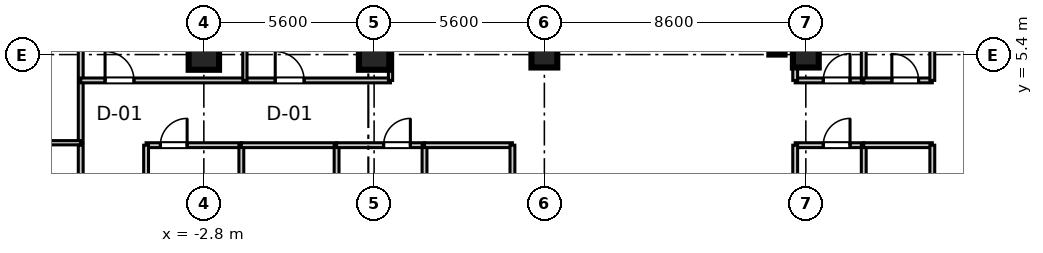
"""IFC4 building model, lengths in metres.
Left out: names, types, materials, properties, quantities, classifications, styles, units other than length and angle.
Written with IfcOpenShell. Run it as: python <this file> out.ifc"""

import sys

from ifc_helpers import new_model, si_unit, direction, frame, frame_2d, origin, origin_2d, place, context, subcontext, project, spatial, rectangle, extrude, source, transform, mapped, element, fill, save


model = new_model("IFC4")
c1 = context("Model", 3, precision=1e-05, world=origin(), true_north=direction((0.0, 1.0)))
c2 = subcontext(c1, "Body", "Model", "MODEL_VIEW")
j1 = project(units=[si_unit("LENGTHUNIT", "METRE"), si_unit("PLANEANGLEUNIT", "RADIAN")], contexts=[c1])
p1 = place(None, origin())
s1 = spatial("IfcSite", under=j1, at=p1, CompositionType="ELEMENT")
p2 = place(p1, origin())
s2 = spatial("IfcBuilding", under=s1, at=p2, CompositionType="ELEMENT")
p3 = place(p2, frame((0.0, 0.0, 227.1)))
s3 = spatial("IfcBuildingStorey", under=s2, at=p3, CompositionType="ELEMENT", Elevation=227.1)
m1 = source(origin(), c2, "Body", "SweptSolid", [
    extrude(rectangle(XDim=1.0, YDim=1.0, at=origin_2d()), origin(), (0.0, 0.0, 1.0), 3.655),
])
for number, where, z_axis, x_axis in (
    (1, (-2.8, 5.4, 0.0), (0.0, 0.0, 1.0), (1.0, 0.0, 0.0)),
    (2, (2.8, 5.4, 0.0), (0.0, 0.0, 1.0), (1.0, 0.0, 0.0)),
):
    element("IfcColumn", number, at=place(p3, frame(where, z_axis=z_axis, x_axis=x_axis)), inside=s3, PredefinedType="COLUMN", context=c2, shape_type="MappedRepresentation", body=[
        mapped(m1, transform((0.0, 0.0, 0.0), scale=1.0)),
    ])
m2 = source(origin(), c2, "Body", "SweptSolid", [
    extrude(rectangle(XDim=0.85, YDim=0.85, at=origin_2d()), origin(), (0.0, 0.0, 1.0), 3.655),
])
for number, where, z_axis, x_axis in (
    (3, (8.4, 5.4, 0.0), (0.0, 0.0, 1.0), (1.0, 0.0, 0.0)),
    (4, (17.0, 5.4, 0.0), (0.0, 0.0, 1.0), (1.0, 0.0, 0.0)),
):
    element("IfcColumn", number, at=place(p3, frame(where, z_axis=z_axis, x_axis=x_axis)), inside=s3, PredefinedType="PILASTER", context=c2, shape_type="MappedRepresentation", body=[
        mapped(m2, transform((0.0, 0.0, 0.0), scale=1.0)),
    ])
m3 = source(origin(), c2, "Body", "SweptSolid", [
    extrude(rectangle(XDim=11.6, YDim=0.5, at=frame_2d((5.8, 0.0))), origin(), (0.0, 0.0, 1.0), 3.41),
])
p4 = place(p3, frame((16.05, 5.4, 0.0), z_axis=(0.0, 0.0, 1.0), x_axis=(0.0, 1.0, 0.0)))
e5 = element("IfcWall", 5, at=p4, inside=s3, PredefinedType="SHEAR", context=c2, shape_type="MappedRepresentation", body=[
    mapped(m3, transform((0.0, 0.0, 0.0), scale=1.0)),
])
m4 = source(origin(), c2, "Body", "SweptSolid", [
    extrude(rectangle(XDim=2.255, YDim=0.16, at=frame_2d((1.127, 0.0))), origin(), (0.0, 0.0, 1.0), 2.75),
])
p5 = place(p3, frame((16.65, 4.55, 0.0), z_axis=(0.0, 0.0, 1.0), x_axis=(1.0, 0.0, 0.0)))
e6 = element("IfcWall", 6, at=p5, inside=s3, PredefinedType="PARTITIONING", context=c2, shape_type="MappedRepresentation", body=[
    mapped(m4, transform((0.0, 0.0, 0.0), scale=1.0)),
])
p6 = place(p5, frame((0.924, 0.0, 0.0)))
e7 = element("IfcOpeningElement", 7, at=p6, cuts=e6, PredefinedType="OPENING", context=c2, shape_type="SweptSolid", body=[
    extrude(rectangle(XDim=0.88, YDim=2.1, at=frame_2d((0.44, 1.05))), frame((0.0, 0.09, 0.0), z_axis=(0.0, -1.0, 0.0), x_axis=(1.0, 0.0, 0.0)), (0.0, 0.0, 1.0), 0.18),
])
m5 = source(origin(), c2, "Body", "SweptSolid", [
    extrude(rectangle(XDim=19.35, YDim=0.16, at=frame_2d((9.675, 0.0))), origin(), (0.0, 0.0, 1.0), 2.75),
])
for number, where, z_axis, x_axis in (
    (8, (16.65, 4.55, 0.0), (0.0, 0.0, 1.0), (0.0, 1.0, 0.0)),
    (9, (18.905, 4.55, 0.0), (0.0, 0.0, 1.0), (0.0, 1.0, 0.0)),
):
    element("IfcWall", number, at=place(p3, frame(where, z_axis=z_axis, x_axis=x_axis)), inside=s3, PredefinedType="PARTITIONING", context=c2, shape_type="MappedRepresentation", body=[
        mapped(m5, transform((0.0, 0.0, 0.0), scale=1.0)),
    ])
m6 = source(origin(), c2, "Body", "SweptSolid", [
    extrude(rectangle(XDim=2.255, YDim=0.16, at=frame_2d((1.127, 0.0))), origin(), (0.0, 0.0, 1.0), 2.75),
])
p7 = place(p3, frame((18.905, 4.55, 0.0), z_axis=(0.0, 0.0, 1.0), x_axis=(1.0, 0.0, 0.0)))
e10 = element("IfcWall", 10, at=p7, inside=s3, PredefinedType="PARTITIONING", context=c2, shape_type="MappedRepresentation", body=[
    mapped(m6, transform((0.0, 0.0, 0.0), scale=1.0)),
])
p8 = place(p7, frame((0.924, 0.0, 0.0)))
e11 = element("IfcOpeningElement", 11, at=p8, cuts=e10, PredefinedType="OPENING", context=c2, shape_type="SweptSolid", body=[
    extrude(rectangle(XDim=0.88, YDim=2.1, at=frame_2d((0.44, 1.05))), frame((0.0, 0.09, 0.0), z_axis=(0.0, -1.0, 0.0), x_axis=(1.0, 0.0, 0.0)), (0.0, 0.0, 1.0), 0.18),
])
m7 = source(origin(), c2, "Body", "SweptSolid", [
    extrude(rectangle(XDim=17.93, YDim=0.16, at=frame_2d((8.965, 0.0))), origin(), (0.0, 0.0, 1.0), 2.75),
])
p9 = place(p3, frame((21.16, 4.55, 0.0), z_axis=(0.0, 0.0, 1.0), x_axis=(0.0, 1.0, 0.0)))
e12 = element("IfcWall", 12, at=p9, inside=s3, PredefinedType="PARTITIONING", context=c2, shape_type="MappedRepresentation", body=[
    mapped(m7, transform((0.0, 0.0, 0.0), scale=1.0)),
])
m8 = source(origin(), c2, "Body", "SweptSolid", [
    extrude(rectangle(XDim=21.4, YDim=0.16, at=frame_2d((10.7, 0.0))), origin(), (0.0, 0.0, 1.0), 2.75),
])
p10 = place(p3, frame((-6.85, 2.5, 0.0), z_axis=(0.0, 0.0, 1.0), x_axis=(0.0, 1.0, 0.0)))
e13 = element("IfcWall", 13, at=p10, inside=s3, PredefinedType="PARTITIONING", context=c2, shape_type="MappedRepresentation", body=[
    mapped(m8, transform((0.0, 0.0, 0.0), scale=1.0)),
])
p11 = place(p10, frame((8.15, 0.0, 0.0)))
e14 = element("IfcOpeningElement", 14, at=p11, cuts=e13, PredefinedType="OPENING", context=c2, shape_type="SweptSolid", body=[
    extrude(rectangle(XDim=0.95, YDim=2.1, at=frame_2d((0.475, 1.05))), frame((0.0, 0.09, 0.0), z_axis=(0.0, -1.0, 0.0), x_axis=(1.0, 0.0, 0.0)), (0.0, 0.0, 1.0), 0.18),
])
m9 = source(origin(), c2, "Body", "SweptSolid", [
    extrude(rectangle(XDim=14.31, YDim=0.14, at=frame_2d((7.155, 0.0))), origin(), (0.0, 0.0, 1.0), 2.75),
])
p12 = place(p3, frame((-21.16, 2.5, 0.0), z_axis=(0.0, 0.0, 1.0), x_axis=(1.0, 0.0, 0.0)))
e15 = element("IfcWall", 15, at=p12, inside=s3, PredefinedType="PARTITIONING", context=c2, shape_type="MappedRepresentation", body=[
    mapped(m9, transform((0.0, 0.0, 0.0), scale=1.0)),
])
m10 = source(origin(), c2, "Body", "SweptSolid", [
    extrude(rectangle(XDim=10.19, YDim=0.16, at=frame_2d((5.095, 0.0))), origin(), (0.0, 0.0, 1.0), 2.75),
])
p13 = place(p3, frame((-6.85, 4.55, 0.0), z_axis=(0.0, 0.0, 1.0), x_axis=(1.0, 0.0, 0.0)))
e16 = element("IfcWall", 16, at=p13, inside=s3, PredefinedType="PARTITIONING", context=c2, shape_type="MappedRepresentation", body=[
    mapped(m10, transform((0.0, 0.0, 0.0), scale=1.0)),
])
p14 = place(p13, frame((0.801, 0.0, 0.0)))
e17 = element("IfcOpeningElement", 17, at=p14, cuts=e16, PredefinedType="OPENING", context=c2, shape_type="SweptSolid", body=[
    extrude(rectangle(XDim=0.95, YDim=2.1, at=frame_2d((0.475, 1.05))), frame((0.0, 0.09, 0.0), z_axis=(0.0, -1.0, 0.0), x_axis=(1.0, 0.0, 0.0)), (0.0, 0.0, 1.0), 0.18),
])
p15 = place(p13, frame((6.398, 0.0, 0.0)))
e18 = element("IfcOpeningElement", 18, at=p15, cuts=e16, PredefinedType="OPENING", context=c2, shape_type="SweptSolid", body=[
    extrude(rectangle(XDim=0.95, YDim=2.1, at=frame_2d((0.475, 1.05))), frame((0.0, 0.09, 0.0), z_axis=(0.0, -1.0, 0.0), x_axis=(1.0, 0.0, 0.0)), (0.0, 0.0, 1.0), 0.18),
])
m11 = source(origin(), c2, "Body", "SweptSolid", [
    extrude(rectangle(XDim=19.35, YDim=0.14, at=frame_2d((9.675, 0.0))), origin(), (0.0, 0.0, 1.0), 2.75),
])
for number, where, z_axis, x_axis in (
    (19, (3.34, 4.55, 0.0), (0.0, 0.0, 1.0), (0.0, 1.0, 0.0)),
    (20, (-1.45, 4.55, 0.0), (0.0, 0.0, 1.0), (0.0, 1.0, 0.0)),
):
    element("IfcWall", number, at=place(p3, frame(where, z_axis=z_axis, x_axis=x_axis)), inside=s3, PredefinedType="PARTITIONING", context=c2, shape_type="MappedRepresentation", body=[
        mapped(m11, transform((0.0, 0.0, 0.0), scale=1.0)),
    ])
m12 = source(origin(), c2, "Body", "SweptSolid", [
    extrude(rectangle(XDim=4.84, YDim=0.16, at=frame_2d((2.42, 0.0))), origin(), (0.0, 0.0, 1.0), 2.75),
])
p16 = place(p3, frame((-6.85, -2.42, 0.0), z_axis=(0.0, 0.0, 1.0), x_axis=(0.0, 1.0, 0.0)))
e21 = element("IfcWall", 21, at=p16, inside=s3, PredefinedType="PARTITIONING", context=c2, shape_type="MappedRepresentation", body=[
    mapped(m12, transform((0.0, 0.0, 0.0), scale=1.0)),
])
p17 = place(p16, frame((1.945, 0.0, 0.0)))
e22 = element("IfcOpeningElement", 22, at=p17, cuts=e21, PredefinedType="OPENING", context=c2, shape_type="SweptSolid", body=[
    extrude(rectangle(XDim=0.95, YDim=2.1, at=frame_2d((0.475, 1.05))), frame((0.0, 0.09, 0.0), z_axis=(0.0, -1.0, 0.0), x_axis=(1.0, 0.0, 0.0)), (0.0, 0.0, 1.0), 0.18),
])
m13 = source(origin(), c2, "Body", "SweptSolid", [
    extrude(rectangle(XDim=3.133, YDim=0.16, at=frame_2d((1.566, 0.0))), origin(), (0.0, 0.0, 1.0), 2.75),
])
p18 = place(p3, frame((-4.7, 2.42, 0.0), z_axis=(0.0, 0.0, 1.0), x_axis=(1.0, 0.0, 0.0)))
e23 = element("IfcWall", 23, at=p18, inside=s3, PredefinedType="PARTITIONING", context=c2, shape_type="MappedRepresentation", body=[
    mapped(m13, transform((0.0, 0.0, 0.0), scale=1.0)),
])
p19 = place(p18, frame((0.47, 0.0, 0.0)))
e24 = element("IfcOpeningElement", 24, at=p19, cuts=e23, PredefinedType="OPENING", context=c2, shape_type="SweptSolid", body=[
    extrude(rectangle(XDim=0.88, YDim=2.1, at=frame_2d((0.44, 1.05))), frame((0.0, 0.09, 0.0), z_axis=(0.0, -1.0, 0.0), x_axis=(1.0, 0.0, 0.0)), (0.0, 0.0, 1.0), 0.18),
])
for number, where, z_axis, x_axis in (
    (25, (-4.7, -2.42, 0.0), (0.0, 0.0, 1.0), (0.0, 1.0, 0.0)),
    (26, (-1.567, -2.42, 0.0), (0.0, 0.0, 1.0), (0.0, 1.0, 0.0)),
):
    element("IfcWall", number, at=place(p3, frame(where, z_axis=z_axis, x_axis=x_axis)), inside=s3, PredefinedType="PARTITIONING", context=c2, shape_type="MappedRepresentation", body=[
        mapped(m12, transform((0.0, 0.0, 0.0), scale=1.0)),
    ])
m14 = source(origin(), c2, "Body", "SweptSolid", [
    extrude(rectangle(XDim=3.133, YDim=0.16, at=frame_2d((1.566, 0.0))), origin(), (0.0, 0.0, 1.0), 2.75),
])
p20 = place(p3, frame((-1.567, 2.42, 0.0), z_axis=(0.0, 0.0, 1.0), x_axis=(1.0, 0.0, 0.0)))
e27 = element("IfcWall", 27, at=p20, inside=s3, PredefinedType="PARTITIONING", context=c2, shape_type="MappedRepresentation", body=[
    mapped(m14, transform((0.0, 0.0, 0.0), scale=1.0)),
])
p21 = place(p3, frame((1.566, -2.42, 0.0), z_axis=(0.0, 0.0, 1.0), x_axis=(0.0, 1.0, 0.0)))
e28 = element("IfcWall", 28, at=p21, inside=s3, PredefinedType="PARTITIONING", context=c2, shape_type="MappedRepresentation", body=[
    mapped(m12, transform((0.0, 0.0, 0.0), scale=1.0)),
])
m15 = source(origin(), c2, "Body", "SweptSolid", [
    extrude(rectangle(XDim=2.892, YDim=0.16, at=frame_2d((1.446, 0.0))), origin(), (0.0, 0.0, 1.0), 2.75),
])
p22 = place(p3, frame((1.566, 2.42, 0.0), z_axis=(0.0, 0.0, 1.0), x_axis=(1.0, 0.0, 0.0)))
e29 = element("IfcWall", 29, at=p22, inside=s3, PredefinedType="PARTITIONING", context=c2, shape_type="MappedRepresentation", body=[
    mapped(m15, transform((0.0, 0.0, 0.0), scale=1.0)),
])
p23 = place(p22, frame((1.547, 0.0, 0.0)))
e30 = element("IfcOpeningElement", 30, at=p23, cuts=e29, PredefinedType="OPENING", context=c2, shape_type="SweptSolid", body=[
    extrude(rectangle(XDim=0.88, YDim=2.1, at=frame_2d((0.44, 1.05))), frame((0.0, 0.09, 0.0), z_axis=(0.0, -1.0, 0.0), x_axis=(1.0, 0.0, 0.0)), (0.0, 0.0, 1.0), 0.18),
])
p24 = place(p3, frame((4.458, -2.42, 0.0), z_axis=(0.0, 0.0, 1.0), x_axis=(0.0, 1.0, 0.0)))
e31 = element("IfcWall", 31, at=p24, inside=s3, PredefinedType="PARTITIONING", context=c2, shape_type="MappedRepresentation", body=[
    mapped(m12, transform((0.0, 0.0, 0.0), scale=1.0)),
])
p25 = place(p3, frame((4.458, 2.42, 0.0), z_axis=(0.0, 0.0, 1.0), x_axis=(1.0, 0.0, 0.0)))
e32 = element("IfcWall", 32, at=p25, inside=s3, PredefinedType="PARTITIONING", context=c2, shape_type="MappedRepresentation", body=[
    mapped(m15, transform((0.0, 0.0, 0.0), scale=1.0)),
])
p26 = place(p3, frame((7.35, -2.42, 0.0), z_axis=(0.0, 0.0, 1.0), x_axis=(0.0, 1.0, 0.0)))
e33 = element("IfcWall", 33, at=p26, inside=s3, PredefinedType="PARTITIONING", context=c2, shape_type="MappedRepresentation", body=[
    mapped(m12, transform((0.0, 0.0, 0.0), scale=1.0)),
])
p27 = place(p3, frame((16.65, 2.42, 0.0), z_axis=(0.0, 0.0, 1.0), x_axis=(1.0, 0.0, 0.0)))
e34 = element("IfcWall", 34, at=p27, inside=s3, PredefinedType="PARTITIONING", context=c2, shape_type="MappedRepresentation", body=[
    mapped(m4, transform((0.0, 0.0, 0.0), scale=1.0)),
])
p28 = place(p27, frame((0.924, 0.0, 0.0)))
e35 = element("IfcOpeningElement", 35, at=p28, cuts=e34, PredefinedType="OPENING", context=c2, shape_type="SweptSolid", body=[
    extrude(rectangle(XDim=0.88, YDim=2.1, at=frame_2d((0.44, 1.05))), frame((0.0, 0.09, 0.0), z_axis=(0.0, -1.0, 0.0), x_axis=(1.0, 0.0, 0.0)), (0.0, 0.0, 1.0), 0.18),
])
for number, where, z_axis, x_axis in (
    (36, (16.65, -2.42, 0.0), (0.0, 0.0, 1.0), (0.0, 1.0, 0.0)),
    (37, (18.905, -2.42, 0.0), (0.0, 0.0, 1.0), (0.0, 1.0, 0.0)),
):
    element("IfcWall", number, at=place(p3, frame(where, z_axis=z_axis, x_axis=x_axis)), inside=s3, PredefinedType="PARTITIONING", context=c2, shape_type="MappedRepresentation", body=[
        mapped(m12, transform((0.0, 0.0, 0.0), scale=1.0)),
    ])
p29 = place(p3, frame((18.905, 2.42, 0.0), z_axis=(0.0, 0.0, 1.0), x_axis=(1.0, 0.0, 0.0)))
e38 = element("IfcWall", 38, at=p29, inside=s3, PredefinedType="PARTITIONING", context=c2, shape_type="MappedRepresentation", body=[
    mapped(m6, transform((0.0, 0.0, 0.0), scale=1.0)),
])
p30 = place(p3, frame((21.16, -2.42, 0.0), z_axis=(0.0, 0.0, 1.0), x_axis=(0.0, 1.0, 0.0)))
e39 = element("IfcWall", 39, at=p30, inside=s3, PredefinedType="PARTITIONING", context=c2, shape_type="MappedRepresentation", body=[
    mapped(m12, transform((0.0, 0.0, 0.0), scale=1.0)),
])
m16 = source(origin(), c2, "Body", "SweptSolid", [
    extrude(rectangle(XDim=0.88, YDim=2.1, at=frame_2d((0.44, 1.05))), frame((0.0, 0.025, 0.0), z_axis=(0.0, -1.0, 0.0), x_axis=(1.0, 0.0, 0.0)), (0.0, 0.0, 1.0), 0.05),
])
p31 = place(p6, origin())
e40 = element("IfcDoor", 40, at=p31, inside=s3, OperationType="SINGLE_SWING_RIGHT", PredefinedType="DOOR", context=c2, shape_type="MappedRepresentation", body=[
    mapped(m16, transform((0.0, 0.0, 0.0), scale=1.0)),
])
fill(e7, e40)
p32 = place(p8, origin())
e41 = element("IfcDoor", 41, at=p32, inside=s3, OperationType="SINGLE_SWING_LEFT", PredefinedType="DOOR", context=c2, shape_type="MappedRepresentation", body=[
    mapped(m16, transform((0.0, 0.0, 0.0), scale=1.0)),
])
fill(e11, e41)
m17 = source(origin(), c2, "Body", "SweptSolid", [
    extrude(rectangle(XDim=0.95, YDim=2.1, at=frame_2d((0.475, 1.05))), frame((0.0, 0.025, 0.0), z_axis=(0.0, -1.0, 0.0), x_axis=(1.0, 0.0, 0.0)), (0.0, 0.0, 1.0), 0.05),
])
p33 = place(p14, origin())
e42 = element("IfcDoor", 42, at=p33, inside=s3, OperationType="SINGLE_SWING_LEFT", PredefinedType="DOOR", context=c2, shape_type="MappedRepresentation", body=[
    mapped(m17, transform((0.0, 0.0, 0.0), scale=1.0)),
])
fill(e17, e42)
p34 = place(p15, origin())
e43 = element("IfcDoor", 43, at=p34, inside=s3, OperationType="SINGLE_SWING_LEFT", PredefinedType="DOOR", context=c2, shape_type="MappedRepresentation", body=[
    mapped(m17, transform((0.0, 0.0, 0.0), scale=1.0)),
])
fill(e18, e43)
p35 = place(p19, frame((0.88, 0.0, 0.0), z_axis=(0.0, 0.0, 1.0), x_axis=(-1.0, 0.0, 0.0)))
e44 = element("IfcDoor", 44, at=p35, inside=s3, OperationType="SINGLE_SWING_RIGHT", PredefinedType="DOOR", context=c2, shape_type="MappedRepresentation", body=[
    mapped(m16, transform((0.0, 0.0, 0.0), scale=1.0)),
])
fill(e24, e44)
p36 = place(p23, frame((0.88, 0.0, 0.0), z_axis=(0.0, 0.0, 1.0), x_axis=(-1.0, 0.0, 0.0)))
e45 = element("IfcDoor", 45, at=p36, inside=s3, OperationType="SINGLE_SWING_RIGHT", PredefinedType="DOOR", context=c2, shape_type="MappedRepresentation", body=[
    mapped(m16, transform((0.0, 0.0, 0.0), scale=1.0)),
])
fill(e30, e45)
p37 = place(p28, frame((0.88, 0.0, 0.0), z_axis=(0.0, 0.0, 1.0), x_axis=(-1.0, 0.0, 0.0)))
e46 = element("IfcDoor", 46, at=p37, inside=s3, OperationType="SINGLE_SWING_RIGHT", PredefinedType="DOOR", context=c2, shape_type="MappedRepresentation", body=[
    mapped(m16, transform((0.0, 0.0, 0.0), scale=1.0)),
])
fill(e35, e46)
save(model, sys.argv[1])
